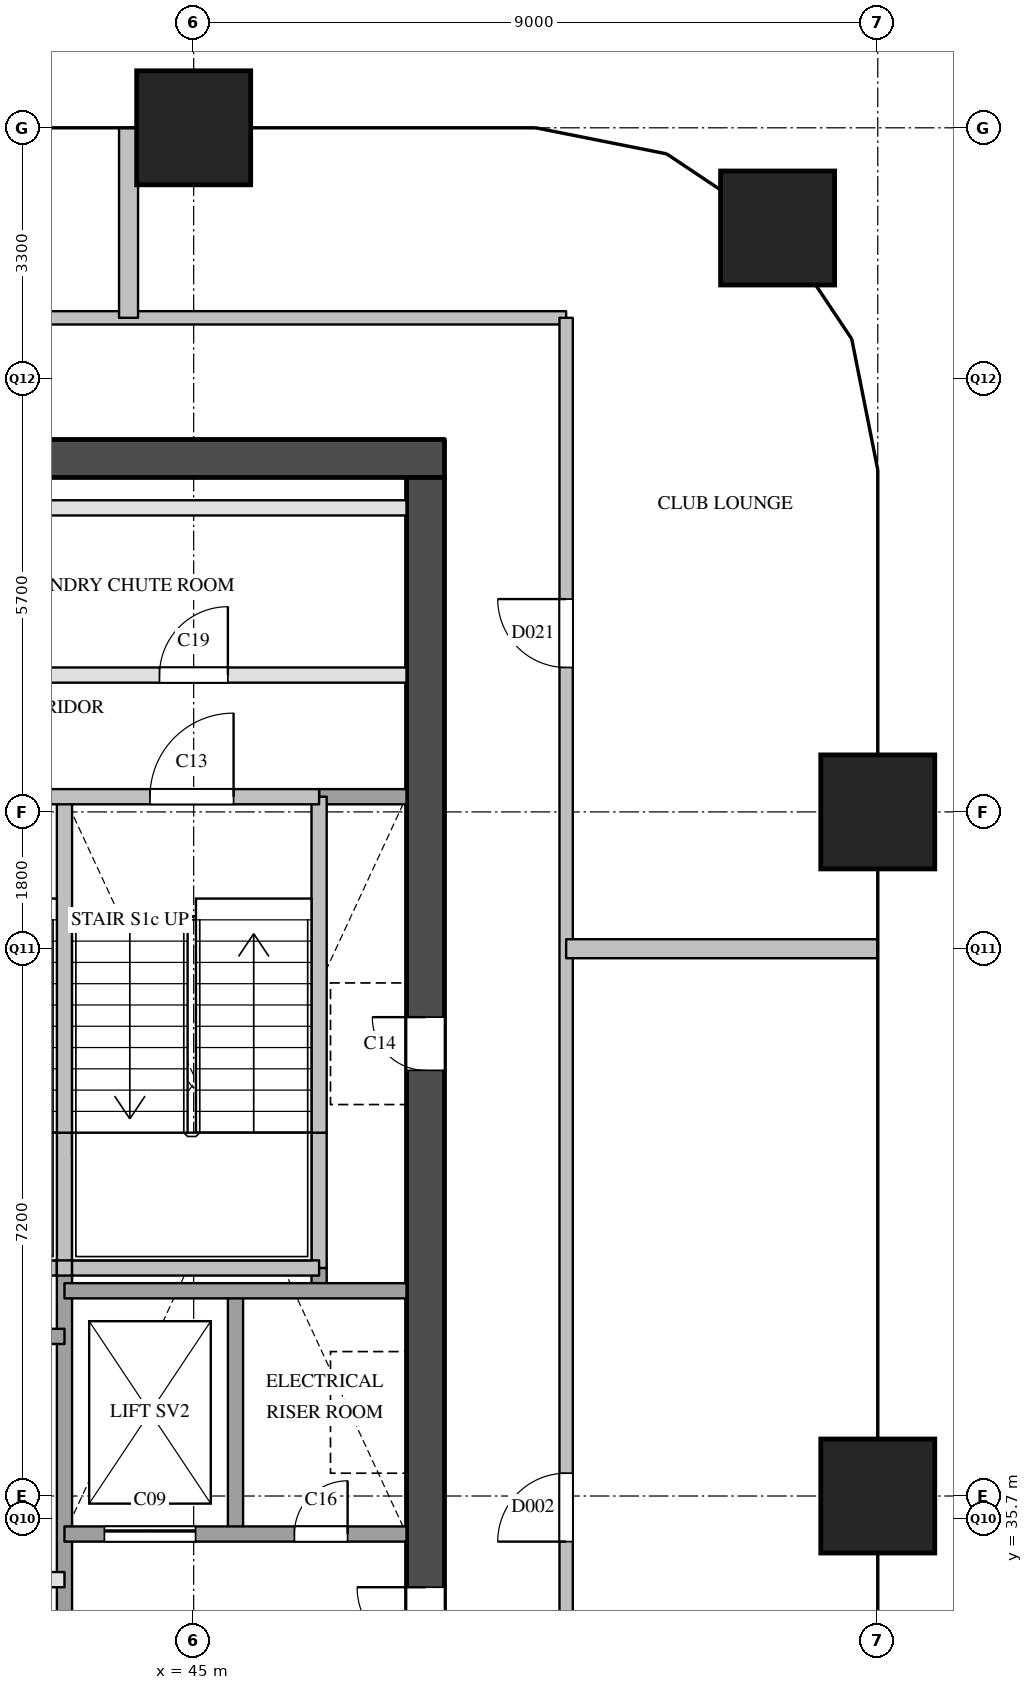
"""IFC4 building model, lengths in metres.
Left out: names, types, materials, properties, quantities, classifications, styles, units other than length and angle.
Written with IfcOpenShell. Run it as: python <this file> out.ifc"""

import sys

from ifc_helpers import new_model, si_unit, direction, frame, frame_2d, origin, origin_2d, place, context, subcontext, project, spatial, rectangle, extrude, element, fill, save


model = new_model("IFC4")
c1 = context("Model", 3, precision=1e-05, world=origin(), true_north=direction((0.0, 1.0)))
c2 = subcontext(c1, "Body", "Model", "MODEL_VIEW")
j1 = project(units=[si_unit("LENGTHUNIT", "METRE"), si_unit("PLANEANGLEUNIT", "RADIAN")], contexts=[c1])
p1 = place(None, origin())
s1 = spatial("IfcSite", under=j1, at=p1, CompositionType="ELEMENT")
p2 = place(p1, origin())
s2 = spatial("IfcBuilding", under=s1, at=p2, CompositionType="ELEMENT")
p3 = place(p2, frame((0.0, 0.0, 193.4)))
s3 = spatial("IfcBuildingStorey", under=s2, at=p3, CompositionType="ELEMENT", Elevation=193.4)
for number, where, z_axis, x_axis in (
    (1, (45.0, 54.0, 0.0), (0.0, 0.0, 1.0), (1.0, 0.0, 0.0)),
    (2, (54.0, 36.0, 0.0), (0.0, 0.0, 1.0), (1.0, 0.0, 0.0)),
    (3, (54.0, 45.0, 0.0), (0.0, 0.0, 1.0), (1.0, 0.0, 0.0)),
    (4, (52.682, 52.682, 0.0), (0.0, 0.0, 1.0), (1.0, 0.0, 0.0)),
):
    element("IfcColumn", number, at=place(p3, frame(where, z_axis=z_axis, x_axis=x_axis)), inside=s3, PredefinedType="COLUMN", context=c2, shape_type="SweptSolid", body=[
        extrude(rectangle(XDim=1.5, YDim=1.5, at=origin_2d()), origin(), (0.0, 0.0, 1.0), 3.9),
    ])
p4 = place(p3, frame((36.1, 49.65, 0.0), z_axis=(0.0, 0.0, 1.0), x_axis=(1.0, 0.0, 0.0)))
e5 = element("IfcWall", 5, at=p4, inside=s3, PredefinedType="SHEAR", context=c2, shape_type="SweptSolid", body=[
    extrude(rectangle(XDim=12.2, YDim=0.5, at=frame_2d((6.1, 0.0))), origin(), (0.0, 0.0, 1.0), 3.4),
])
p5 = place(p3, frame((48.05, 29.1, 0.0), z_axis=(0.0, 0.0, 1.0), x_axis=(0.0, 1.0, 0.0)))
e6 = element("IfcWall", 6, at=p5, inside=s3, PredefinedType="SHEAR", context=c2, shape_type="SweptSolid", body=[
    extrude(rectangle(XDim=20.3, YDim=0.5, at=frame_2d((10.15, 0.0))), origin(), (0.0, 0.0, 1.0), 3.4),
])
p6 = place(p5, frame((12.5, 0.0, 0.0)))
e7 = element("IfcOpeningElement", 7, at=p6, cuts=e6, PredefinedType="OPENING", context=c2, shape_type="SweptSolid", body=[
    extrude(rectangle(XDim=0.7, YDim=2.1, at=frame_2d((0.35, 1.05))), frame((0.0, 0.26, 0.0), z_axis=(0.0, -1.0, 0.0), x_axis=(1.0, 0.0, 0.0)), (0.0, 0.0, 1.0), 0.52),
])
p7 = place(p5, frame((3.9, 0.0, 0.0)))
e8 = element("IfcOpeningElement", 8, at=p7, cuts=e6, PredefinedType="OPENING", context=c2, shape_type="SweptSolid", body=[
    extrude(rectangle(XDim=1.8, YDim=2.1, at=frame_2d((0.9, 1.05))), frame((0.0, 0.26, 0.0), z_axis=(0.0, -1.0, 0.0), x_axis=(1.0, 0.0, 0.0)), (0.0, 0.0, 1.0), 0.52),
])
p8 = place(p3, frame((43.3, 29.1, 0.0), z_axis=(0.0, 0.0, 1.0), x_axis=(0.0, 1.0, 0.0)))
e9 = element("IfcWall", 9, at=p8, inside=s3, PredefinedType="SOLIDWALL", context=c2, shape_type="SweptSolid", body=[
    extrude(rectangle(XDim=9.9, YDim=0.2, at=frame_2d((4.95, 0.0))), origin(), (0.0, 0.0, 1.0), 3.4),
])
p9 = place(p3, frame((43.3, 39.0, 0.0), z_axis=(0.0, 0.0, 1.0), x_axis=(0.0, 1.0, 0.0)))
e10 = element("IfcWall", 10, at=p9, inside=s3, PredefinedType="SOLIDWALL", context=c2, shape_type="SweptSolid", body=[
    extrude(rectangle(XDim=1.78, YDim=0.2, at=frame_2d((0.89, 0.0))), origin(), (0.0, 0.0, 1.0), 3.4),
])
p10 = place(p3, frame((43.3, 40.78, 0.0), z_axis=(0.0, 0.0, 1.0), x_axis=(0.0, 1.0, 0.0)))
e11 = element("IfcWall", 11, at=p10, inside=s3, PredefinedType="SOLIDWALL", context=c2, shape_type="SweptSolid", body=[
    extrude(rectangle(XDim=4.42, YDim=0.2, at=frame_2d((2.21, 0.0))), origin(), (0.0, 0.0, 1.0), 3.4),
])
p11 = place(p3, frame((45.55, 35.5, 0.0), z_axis=(0.0, 0.0, 1.0), x_axis=(0.0, 1.0, 0.0)))
e12 = element("IfcWall", 12, at=p11, inside=s3, PredefinedType="SOLIDWALL", context=c2, shape_type="SweptSolid", body=[
    extrude(rectangle(XDim=3.2, YDim=0.2, at=frame_2d((1.6, 0.0))), origin(), (0.0, 0.0, 1.0), 3.4),
])
p12 = place(p3, frame((46.65, 38.7, 0.0), z_axis=(0.0, 0.0, 1.0), x_axis=(0.0, 1.0, 0.0)))
e13 = element("IfcWall", 13, at=p12, inside=s3, PredefinedType="SOLIDWALL", context=c2, shape_type="SweptSolid", body=[
    extrude(rectangle(XDim=0.3, YDim=0.2, at=frame_2d((0.15, 0.0))), origin(), (0.0, 0.0, 1.0), 3.4),
])
p13 = place(p3, frame((46.65, 39.0, 0.0), z_axis=(0.0, 0.0, 1.0), x_axis=(0.0, 1.0, 0.0)))
e14 = element("IfcWall", 14, at=p13, inside=s3, PredefinedType="SOLIDWALL", context=c2, shape_type="SweptSolid", body=[
    extrude(rectangle(XDim=1.78, YDim=0.2, at=frame_2d((0.89, 0.0))), origin(), (0.0, 0.0, 1.0), 3.4),
])
p14 = place(p3, frame((46.65, 40.78, 0.0), z_axis=(0.0, 0.0, 1.0), x_axis=(0.0, 1.0, 0.0)))
e15 = element("IfcWall", 15, at=p14, inside=s3, PredefinedType="SOLIDWALL", context=c2, shape_type="SweptSolid", body=[
    extrude(rectangle(XDim=4.42, YDim=0.2, at=frame_2d((2.21, 0.0))), origin(), (0.0, 0.0, 1.0), 3.4),
])
p15 = place(p3, frame((42.9, 34.9, 0.0), z_axis=(0.0, 0.0, 1.0), x_axis=(1.0, 0.0, 0.0)))
e16 = element("IfcWall", 16, at=p15, inside=s3, PredefinedType="PARTITIONING", context=c2, shape_type="SweptSolid", body=[
    extrude(rectangle(XDim=0.4, YDim=0.2, at=frame_2d((0.2, 0.0))), origin(), (0.0, 0.0, 1.0), 3.4),
])
p16 = place(p3, frame((43.3, 35.5, 0.0), z_axis=(0.0, 0.0, 1.0), x_axis=(1.0, 0.0, 0.0)))
e17 = element("IfcWall", 17, at=p16, inside=s3, PredefinedType="SOLIDWALL", context=c2, shape_type="SweptSolid", body=[
    extrude(rectangle(XDim=4.5, YDim=0.2, at=frame_2d((2.25, 0.0))), origin(), (0.0, 0.0, 1.0), 3.4),
])
p17 = place(p16, frame((0.525, 0.0, 0.0)))
e18 = element("IfcOpeningElement", 18, at=p17, cuts=e17, PredefinedType="OPENING", context=c2, shape_type="SweptSolid", body=[
    extrude(rectangle(XDim=1.2, YDim=2.1, at=frame_2d((0.6, 1.05))), frame((0.0, 0.11, 0.0), z_axis=(0.0, -1.0, 0.0), x_axis=(1.0, 0.0, 0.0)), (0.0, 0.0, 1.0), 0.22),
])
p18 = place(p16, frame((3.025, 0.0, 0.0)))
e19 = element("IfcOpeningElement", 19, at=p18, cuts=e17, PredefinedType="OPENING", context=c2, shape_type="SweptSolid", body=[
    extrude(rectangle(XDim=0.7, YDim=2.1, at=frame_2d((0.35, 1.05))), frame((0.0, 0.11, 0.0), z_axis=(0.0, -1.0, 0.0), x_axis=(1.0, 0.0, 0.0)), (0.0, 0.0, 1.0), 0.22),
])
p19 = place(p3, frame((36.6, 38.1, 0.0), z_axis=(0.0, 0.0, 1.0), x_axis=(1.0, 0.0, 0.0)))
e20 = element("IfcWall", 20, at=p19, inside=s3, PredefinedType="SOLIDWALL", context=c2, shape_type="SweptSolid", body=[
    extrude(rectangle(XDim=6.7, YDim=0.2, at=frame_2d((3.35, 0.0))), origin(), (0.0, 0.0, 1.0), 3.4),
])
p20 = place(p19, frame((0.45, 0.0, 0.0)))
e21 = element("IfcOpeningElement", 21, at=p20, cuts=e20, PredefinedType="OPENING", context=c2, shape_type="SweptSolid", body=[
    extrude(rectangle(XDim=1.2, YDim=2.1, at=frame_2d((0.6, 1.05))), frame((0.0, 0.11, 0.0), z_axis=(0.0, -1.0, 0.0), x_axis=(1.0, 0.0, 0.0)), (0.0, 0.0, 1.0), 0.22),
])
p21 = place(p19, frame((2.55, 0.0, 0.0)))
e22 = element("IfcOpeningElement", 22, at=p21, cuts=e20, PredefinedType="OPENING", context=c2, shape_type="SweptSolid", body=[
    extrude(rectangle(XDim=1.2, YDim=2.1, at=frame_2d((0.6, 1.05))), frame((0.0, 0.11, 0.0), z_axis=(0.0, -1.0, 0.0), x_axis=(1.0, 0.0, 0.0)), (0.0, 0.0, 1.0), 0.22),
])
p22 = place(p19, frame((4.65, 0.0, 0.0)))
e23 = element("IfcOpeningElement", 23, at=p22, cuts=e20, PredefinedType="OPENING", context=c2, shape_type="SweptSolid", body=[
    extrude(rectangle(XDim=1.2, YDim=2.1, at=frame_2d((0.6, 1.05))), frame((0.0, 0.11, 0.0), z_axis=(0.0, -1.0, 0.0), x_axis=(1.0, 0.0, 0.0)), (0.0, 0.0, 1.0), 0.22),
])
p23 = place(p3, frame((43.3, 38.7, 0.0), z_axis=(0.0, 0.0, 1.0), x_axis=(1.0, 0.0, 0.0)))
e24 = element("IfcWall", 24, at=p23, inside=s3, PredefinedType="SOLIDWALL", context=c2, shape_type="SweptSolid", body=[
    extrude(rectangle(XDim=4.5, YDim=0.2, at=frame_2d((2.25, 0.0))), origin(), (0.0, 0.0, 1.0), 3.4),
])
p24 = place(p3, frame((40.05, 39.0, 0.0), z_axis=(0.0, 0.0, 1.0), x_axis=(1.0, 0.0, 0.0)))
e25 = element("IfcWall", 25, at=p24, inside=s3, PredefinedType="SOLIDWALL", context=c2, shape_type="SweptSolid", body=[
    extrude(rectangle(XDim=3.15, YDim=0.2, at=frame_2d((1.575, 0.0))), origin(), (0.0, 0.0, 1.0), 3.4),
])
p25 = place(p3, frame((43.2, 39.0, 0.0), z_axis=(0.0, 0.0, 1.0), x_axis=(1.0, 0.0, 0.0)))
e26 = element("IfcWall", 26, at=p25, inside=s3, PredefinedType="SOLIDWALL", context=c2, shape_type="SweptSolid", body=[
    extrude(rectangle(XDim=0.2, YDim=0.2, at=frame_2d((0.1, 0.0))), origin(), (0.0, 0.0, 1.0), 3.4),
])
p26 = place(p3, frame((43.4, 39.0, 0.0), z_axis=(0.0, 0.0, 1.0), x_axis=(1.0, 0.0, 0.0)))
e27 = element("IfcWall", 27, at=p26, inside=s3, PredefinedType="SOLIDWALL", context=c2, shape_type="SweptSolid", body=[
    extrude(rectangle(XDim=3.25, YDim=0.2, at=frame_2d((1.625, 0.0))), origin(), (0.0, 0.0, 1.0), 3.4),
])
p27 = place(p3, frame((46.65, 45.2, 0.0), z_axis=(0.0, 0.0, 1.0), x_axis=(1.0, 0.0, 0.0)))
e28 = element("IfcWall", 28, at=p27, inside=s3, PredefinedType="SOLIDWALL", context=c2, shape_type="SweptSolid", body=[
    extrude(rectangle(XDim=1.15, YDim=0.2, at=frame_2d((0.575, 0.0))), origin(), (0.0, 0.0, 1.0), 3.4),
])
p28 = place(p3, frame((36.6, 45.2, 0.0), z_axis=(0.0, 0.0, 1.0), x_axis=(1.0, 0.0, 0.0)))
e29 = element("IfcWall", 29, at=p28, inside=s3, PredefinedType="SOLIDWALL", context=c2, shape_type="SweptSolid", body=[
    extrude(rectangle(XDim=10.05, YDim=0.2, at=frame_2d((5.025, 0.0))), origin(), (0.0, 0.0, 1.0), 3.4),
])
p29 = place(p28, frame((1.125, 0.0, 0.0)))
e30 = element("IfcOpeningElement", 30, at=p29, cuts=e29, PredefinedType="OPENING", context=c2, shape_type="SweptSolid", body=[
    extrude(rectangle(XDim=1.1, YDim=2.1, at=frame_2d((0.55, 1.05))), frame((0.0, 0.11, 0.0), z_axis=(0.0, -1.0, 0.0), x_axis=(1.0, 0.0, 0.0)), (0.0, 0.0, 1.0), 0.22),
])
p30 = place(p28, frame((4.475, 0.0, 0.0)))
e31 = element("IfcOpeningElement", 31, at=p30, cuts=e29, PredefinedType="OPENING", context=c2, shape_type="SweptSolid", body=[
    extrude(rectangle(XDim=1.1, YDim=2.1, at=frame_2d((0.55, 1.05))), frame((0.0, 0.11, 0.0), z_axis=(0.0, -1.0, 0.0), x_axis=(1.0, 0.0, 0.0)), (0.0, 0.0, 1.0), 0.22),
])
p31 = place(p28, frame((7.825, 0.0, 0.0)))
e32 = element("IfcOpeningElement", 32, at=p31, cuts=e29, PredefinedType="OPENING", context=c2, shape_type="SweptSolid", body=[
    extrude(rectangle(XDim=1.1, YDim=2.1, at=frame_2d((0.55, 1.05))), frame((0.0, 0.11, 0.0), z_axis=(0.0, -1.0, 0.0), x_axis=(1.0, 0.0, 0.0)), (0.0, 0.0, 1.0), 0.22),
])
p32 = place(p3, frame((36.6, 46.8, 0.0), z_axis=(0.0, 0.0, 1.0), x_axis=(1.0, 0.0, 0.0)))
e33 = element("IfcWall", 33, at=p32, inside=s3, PredefinedType="PARTITIONING", context=c2, shape_type="SweptSolid", body=[
    extrude(rectangle(XDim=11.2, YDim=0.2, at=frame_2d((5.6, 0.0))), origin(), (0.0, 0.0, 1.0), 3.4),
])
p33 = place(p32, frame((2.35, 0.0, 0.0)))
e34 = element("IfcOpeningElement", 34, at=p33, cuts=e33, PredefinedType="OPENING", context=c2, shape_type="SweptSolid", body=[
    extrude(rectangle(XDim=0.9, YDim=2.1, at=frame_2d((0.45, 1.05))), frame((0.0, 0.11, 0.0), z_axis=(0.0, -1.0, 0.0), x_axis=(1.0, 0.0, 0.0)), (0.0, 0.0, 1.0), 0.22),
])
p34 = place(p32, frame((7.95, 0.0, 0.0)))
e35 = element("IfcOpeningElement", 35, at=p34, cuts=e33, PredefinedType="OPENING", context=c2, shape_type="SweptSolid", body=[
    extrude(rectangle(XDim=0.9, YDim=2.1, at=frame_2d((0.45, 1.05))), frame((0.0, 0.11, 0.0), z_axis=(0.0, -1.0, 0.0), x_axis=(1.0, 0.0, 0.0)), (0.0, 0.0, 1.0), 0.22),
])
p35 = place(p3, frame((36.6, 49.0, 0.0), z_axis=(0.0, 0.0, 1.0), x_axis=(1.0, 0.0, 0.0)))
e36 = element("IfcWall", 36, at=p35, inside=s3, PredefinedType="PARTITIONING", context=c2, shape_type="SweptSolid", body=[
    extrude(rectangle(XDim=11.2, YDim=0.2, at=frame_2d((5.6, 0.0))), origin(), (0.0, 0.0, 1.0), 3.4),
])
p36 = place(p3, frame((34.5, 51.5, 0.0), z_axis=(0.0, 0.0, 1.0), x_axis=(1.0, 0.0, 0.0)))
e37 = element("IfcWall", 37, at=p36, inside=s3, PredefinedType="PARTITIONING", context=c2, shape_type="SweptSolid", body=[
    extrude(rectangle(XDim=15.4, YDim=0.175, at=frame_2d((7.7, 0.0))), origin(), (0.0, 0.0, 1.0), 3.4),
])
p37 = place(p36, frame((5.401, 0.0, 0.0)))
e38 = element("IfcOpeningElement", 38, at=p37, cuts=e37, PredefinedType="OPENING", context=c2, shape_type="SweptSolid", body=[
    extrude(rectangle(XDim=0.9, YDim=2.1, at=frame_2d((0.45, 1.05))), frame((0.0, 0.097, 0.0), z_axis=(0.0, -1.0, 0.0), x_axis=(1.0, 0.0, 0.0)), (0.0, 0.0, 1.0), 0.195),
])
p38 = place(p3, frame((49.9, 28.5, 0.0), z_axis=(0.0, 0.0, 1.0), x_axis=(0.0, 1.0, 0.0)))
e39 = element("IfcWall", 39, at=p38, inside=s3, PredefinedType="PARTITIONING", context=c2, shape_type="SweptSolid", body=[
    extrude(rectangle(XDim=23.0, YDim=0.175, at=frame_2d((11.5, 0.0))), origin(), (0.0, 0.0, 1.0), 3.4),
])
p39 = place(p38, frame((6.9, 0.0, 0.0)))
e40 = element("IfcOpeningElement", 40, at=p39, cuts=e39, PredefinedType="OPENING", context=c2, shape_type="SweptSolid", body=[
    extrude(rectangle(XDim=0.9, YDim=2.1, at=frame_2d((0.45, 1.05))), frame((0.0, 0.097, 0.0), z_axis=(0.0, -1.0, 0.0), x_axis=(1.0, 0.0, 0.0)), (0.0, 0.0, 1.0), 0.195),
])
p40 = place(p38, frame((18.4, 0.0, 0.0)))
e41 = element("IfcOpeningElement", 41, at=p40, cuts=e39, PredefinedType="OPENING", context=c2, shape_type="SweptSolid", body=[
    extrude(rectangle(XDim=0.9, YDim=2.1, at=frame_2d((0.45, 1.05))), frame((0.0, 0.097, 0.0), z_axis=(0.0, -1.0, 0.0), x_axis=(1.0, 0.0, 0.0)), (0.0, 0.0, 1.0), 0.195),
])
p41 = place(p3, frame((49.9, 43.2, 0.0), z_axis=(0.0, 0.0, 1.0), x_axis=(1.0, 0.0, 0.0)))
e42 = element("IfcWall", 42, at=p41, inside=s3, PredefinedType="PARTITIONING", context=c2, shape_type="SweptSolid", body=[
    extrude(rectangle(XDim=4.1, YDim=0.25, at=frame_2d((2.05, 0.0))), origin(), (0.0, 0.0, 1.0), 2.4),
])
p42 = place(p3, frame((44.143, 51.5, 0.0), z_axis=(0.0, 0.0, 1.0), x_axis=(0.0, 1.0, 0.0)))
e43 = element("IfcWall", 43, at=p42, inside=s3, PredefinedType="PARTITIONING", context=c2, shape_type="SweptSolid", body=[
    extrude(rectangle(XDim=2.5, YDim=0.25, at=frame_2d((1.25, 0.0))), origin(), (0.0, 0.0, 1.0), 2.4),
])
p43 = place(p17, origin())
e44 = element("IfcDoor", 44, at=p43, inside=s3, OperationType="SLIDING_TO_LEFT", PredefinedType="DOOR", context=c2, shape_type="SweptSolid", body=[
    extrude(rectangle(XDim=1.2, YDim=2.1, at=frame_2d((0.6, 1.05))), frame((0.0, 0.025, 0.0), z_axis=(0.0, -1.0, 0.0), x_axis=(1.0, 0.0, 0.0)), (0.0, 0.0, 1.0), 0.05),
])
fill(e18, e44)
p44 = place(p31, origin())
e45 = element("IfcDoor", 45, at=p44, inside=s3, OperationType="SINGLE_SWING_RIGHT", PredefinedType="DOOR", context=c2, shape_type="SweptSolid", body=[
    extrude(rectangle(XDim=1.1, YDim=2.1, at=frame_2d((0.55, 1.05))), frame((0.0, 0.025, 0.0), z_axis=(0.0, -1.0, 0.0), x_axis=(1.0, 0.0, 0.0)), (0.0, 0.0, 1.0), 0.05),
])
fill(e32, e45)
p45 = place(p6, origin())
e46 = element("IfcDoor", 46, at=p45, inside=s3, OperationType="SINGLE_SWING_RIGHT", PredefinedType="DOOR", context=c2, shape_type="SweptSolid", body=[
    extrude(rectangle(XDim=0.7, YDim=2.1, at=frame_2d((0.35, 1.05))), frame((0.0, 0.025, 0.0), z_axis=(0.0, -1.0, 0.0), x_axis=(1.0, 0.0, 0.0)), (0.0, 0.0, 1.0), 0.05),
])
fill(e7, e46)
p46 = place(p7, origin())
e47 = element("IfcDoor", 47, at=p46, inside=s3, OperationType="DOUBLE_DOOR_SINGLE_SWING", PredefinedType="DOOR", context=c2, shape_type="SweptSolid", body=[
    extrude(rectangle(XDim=1.8, YDim=2.1, at=frame_2d((0.9, 1.05))), frame((0.0, 0.025, 0.0), z_axis=(0.0, -1.0, 0.0), x_axis=(1.0, 0.0, 0.0)), (0.0, 0.0, 1.0), 0.05),
])
fill(e8, e47)
p47 = place(p18, origin())
e48 = element("IfcDoor", 48, at=p47, inside=s3, OperationType="SINGLE_SWING_RIGHT", PredefinedType="DOOR", context=c2, shape_type="SweptSolid", body=[
    extrude(rectangle(XDim=0.7, YDim=2.1, at=frame_2d((0.35, 1.05))), frame((0.0, 0.025, 0.0), z_axis=(0.0, -1.0, 0.0), x_axis=(1.0, 0.0, 0.0)), (0.0, 0.0, 1.0), 0.05),
])
fill(e19, e48)
p48 = place(p34, origin())
e49 = element("IfcDoor", 49, at=p48, inside=s3, OperationType="SINGLE_SWING_RIGHT", PredefinedType="DOOR", context=c2, shape_type="SweptSolid", body=[
    extrude(rectangle(XDim=0.9, YDim=2.1, at=frame_2d((0.45, 1.05))), frame((0.0, 0.025, 0.0), z_axis=(0.0, -1.0, 0.0), x_axis=(1.0, 0.0, 0.0)), (0.0, 0.0, 1.0), 0.05),
])
fill(e35, e49)
p49 = place(p39, origin())
e50 = element("IfcDoor", 50, at=p49, inside=s3, OperationType="SINGLE_SWING_LEFT", PredefinedType="DOOR", context=c2, shape_type="SweptSolid", body=[
    extrude(rectangle(XDim=0.9, YDim=2.1, at=frame_2d((0.45, 1.05))), frame((0.0, 0.025, 0.0), z_axis=(0.0, -1.0, 0.0), x_axis=(1.0, 0.0, 0.0)), (0.0, 0.0, 1.0), 0.05),
])
fill(e40, e50)
p50 = place(p40, origin())
e51 = element("IfcDoor", 51, at=p50, inside=s3, OperationType="SINGLE_SWING_RIGHT", PredefinedType="DOOR", context=c2, shape_type="SweptSolid", body=[
    extrude(rectangle(XDim=0.9, YDim=2.1, at=frame_2d((0.45, 1.05))), frame((0.0, 0.025, 0.0), z_axis=(0.0, -1.0, 0.0), x_axis=(1.0, 0.0, 0.0)), (0.0, 0.0, 1.0), 0.05),
])
fill(e41, e51)
save(model, sys.argv[1])
